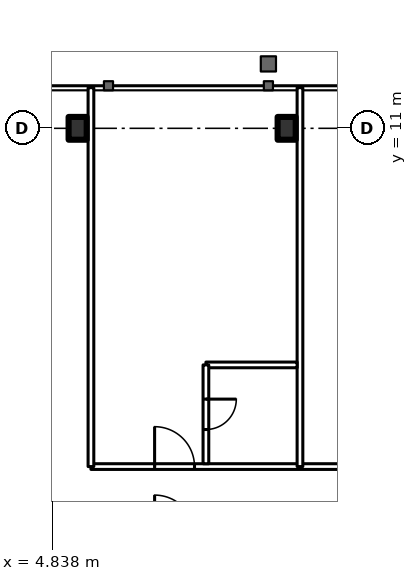
"""IFC4 building model, lengths in metres.
Left out: names, types, materials, properties, quantities, classifications, styles, units other than length and angle.
Written with IfcOpenShell. Run it as: python <this file> out.ifc"""

import sys

from ifc_helpers import new_model, si_unit, direction, frame, frame_2d, origin, origin_2d, place, context, subcontext, project, spatial, rectangle, i_section, extrude, element, fill, save


model = new_model("IFC4")
c1 = context("Model", 3, precision=1e-05, world=origin(), true_north=direction((0.0, 1.0)))
c2 = subcontext(c1, "Body", "Model", "MODEL_VIEW")
j1 = project(units=[si_unit("LENGTHUNIT", "METRE"), si_unit("PLANEANGLEUNIT", "RADIAN")], contexts=[c1])
p1 = place(None, origin())
s1 = spatial("IfcSite", under=j1, at=p1, CompositionType="ELEMENT")
p2 = place(p1, origin())
s2 = spatial("IfcBuilding", under=s1, at=p2, CompositionType="ELEMENT")
p3 = place(p2, frame((0.0, 0.0, 229.7)))
s3 = spatial("IfcBuildingStorey", under=s2, at=p3, CompositionType="ELEMENT", Elevation=229.7)
for number, where, z_axis, x_axis in (
    (1, (5.5, 11.0, 0.0), (0.0, 0.0, 1.0), (1.0, 0.0, 0.0)),
    (2, (11.0, 11.0, 0.0), (0.0, 0.0, 1.0), (1.0, 0.0, 0.0)),
):
    element("IfcColumn", number, at=place(p3, frame(where, z_axis=z_axis, x_axis=x_axis)), inside=s3, PredefinedType="COLUMN", context=c2, shape_type="SweptSolid", body=[
        extrude(i_section(OverallWidth=0.476, OverallDepth=0.6, WebThickness=0.1, FlangeThickness=0.14, FilletRadius=0.02, at=origin_2d()), origin(), (0.0, 0.0, 1.0), 3.6),
    ])
p4 = place(p3, frame((5.85, 2.1, 0.0), z_axis=(0.0, 0.0, 1.0), x_axis=(1.0, 0.0, 0.0)))
e3 = element("IfcWall", 3, at=p4, inside=s3, PredefinedType="PARTITIONING", context=c2, shape_type="SweptSolid", body=[
    extrude(rectangle(XDim=21.65, YDim=0.15, at=frame_2d((10.825, 0.0))), origin(), (0.0, 0.0, 1.0), 3.4),
])
p5 = place(p4, frame((1.675, 0.0, 0.0)))
e4 = element("IfcOpeningElement", 4, at=p5, cuts=e3, PredefinedType="OPENING", context=c2, shape_type="SweptSolid", body=[
    extrude(rectangle(XDim=1.05, YDim=2.4, at=frame_2d((0.525, 1.2))), frame((0.0, 0.085, 0.0), z_axis=(0.0, -1.0, 0.0), x_axis=(1.0, 0.0, 0.0)), (0.0, 0.0, 1.0), 0.17),
])
p6 = place(p4, frame((7.175, 0.0, 0.0)))
e5 = element("IfcOpeningElement", 5, at=p6, cuts=e3, PredefinedType="OPENING", context=c2, shape_type="SweptSolid", body=[
    extrude(rectangle(XDim=1.05, YDim=2.4, at=frame_2d((0.525, 1.2))), frame((0.0, 0.085, 0.0), z_axis=(0.0, -1.0, 0.0), x_axis=(1.0, 0.0, 0.0)), (0.0, 0.0, 1.0), 0.17),
])
p7 = place(p4, frame((19.175, 0.0, 0.0)))
e6 = element("IfcOpeningElement", 6, at=p7, cuts=e3, PredefinedType="OPENING", context=c2, shape_type="SweptSolid", body=[
    extrude(rectangle(XDim=1.05, YDim=2.4, at=frame_2d((0.525, 1.2))), frame((0.0, 0.085, 0.0), z_axis=(0.0, -1.0, 0.0), x_axis=(1.0, 0.0, 0.0)), (0.0, 0.0, 1.0), 0.17),
])
for number, where, z_axis, x_axis in (
    (7, (5.85, 2.1, 0.0), (0.0, 0.0, 1.0), (0.0, 1.0, 0.0)),
    (8, (11.35, 2.1, 0.0), (0.0, 0.0, 1.0), (0.0, 1.0, 0.0)),
):
    element("IfcWall", number, at=place(p3, frame(where, z_axis=z_axis, x_axis=x_axis)), inside=s3, PredefinedType="PARTITIONING", context=c2, shape_type="SweptSolid", body=[
        extrude(rectangle(XDim=9.97, YDim=0.15, at=frame_2d((4.985, 0.0))), origin(), (0.0, 0.0, 1.0), 3.4),
    ])
p8 = place(p3, frame((8.875, 4.775, 0.0), z_axis=(0.0, 0.0, 1.0), x_axis=(1.0, 0.0, 0.0)))
e9 = element("IfcWall", 9, at=p8, inside=s3, PredefinedType="PARTITIONING", context=c2, shape_type="SweptSolid", body=[
    extrude(rectangle(XDim=2.4, YDim=0.15, at=frame_2d((1.2, 0.0))), origin(), (0.0, 0.0, 1.0), 3.4),
])
p9 = place(p3, frame((8.875, 2.175, 0.0), z_axis=(0.0, 0.0, 1.0), x_axis=(0.0, 1.0, 0.0)))
e10 = element("IfcWall", 10, at=p9, inside=s3, PredefinedType="PARTITIONING", context=c2, shape_type="SweptSolid", body=[
    extrude(rectangle(XDim=2.6, YDim=0.15, at=frame_2d((1.3, 0.0))), origin(), (0.0, 0.0, 1.0), 3.4),
])
p10 = place(p9, frame((0.9, 0.0, 0.0)))
e11 = element("IfcOpeningElement", 11, at=p10, cuts=e10, PredefinedType="OPENING", context=c2, shape_type="SweptSolid", body=[
    extrude(rectangle(XDim=0.8, YDim=2.2, at=frame_2d((0.4, 1.1))), frame((0.0, 0.085, 0.0), z_axis=(0.0, -1.0, 0.0), x_axis=(1.0, 0.0, 0.0)), (0.0, 0.0, 1.0), 0.17),
])
p11 = place(p10, origin())
e12 = element("IfcDoor", 12, at=p11, inside=s3, OperationType="SINGLE_SWING_RIGHT", PredefinedType="DOOR", context=c2, shape_type="SweptSolid", body=[
    extrude(rectangle(XDim=0.8, YDim=2.2, at=frame_2d((0.4, 1.1))), frame((0.0, 0.025, 0.0), z_axis=(0.0, -1.0, 0.0), x_axis=(1.0, 0.0, 0.0)), (0.0, 0.0, 1.0), 0.05),
])
fill(e11, e12)
p12 = place(p5, origin())
e13 = element("IfcDoor", 13, at=p12, inside=s3, OperationType="SINGLE_SWING_LEFT", PredefinedType="DOOR", context=c2, shape_type="SweptSolid", body=[
    extrude(rectangle(XDim=1.05, YDim=2.4, at=frame_2d((0.525, 1.2))), frame((0.0, 0.025, 0.0), z_axis=(0.0, -1.0, 0.0), x_axis=(1.0, 0.0, 0.0)), (0.0, 0.0, 1.0), 0.05),
])
fill(e4, e13)
save(model, sys.argv[1])
